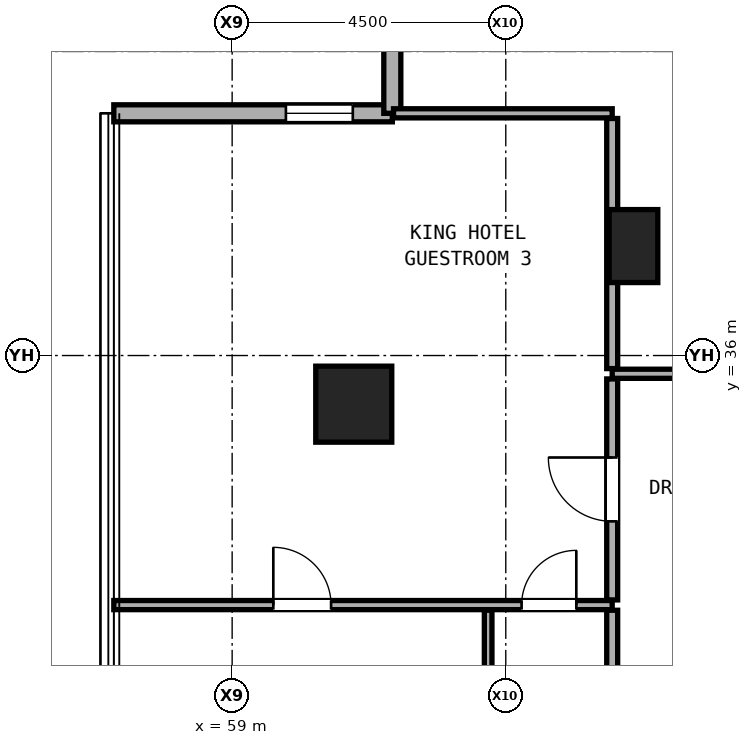
"""IFC4 building model, lengths in metres.
Left out: names, types, materials, properties, quantities, classifications, styles, units other than length and angle.
Written with IfcOpenShell. Run it as: python <this file> out.ifc"""

import sys

from ifc_helpers import new_model, si_unit, direction, frame, frame_2d, origin, origin_2d, place, context, subcontext, project, spatial, rectangle, hollow_rectangle, extrude, element, fill, save


model = new_model("IFC4")
c1 = context("Model", 3, precision=1e-05, world=origin(), true_north=direction((0.0, 1.0)))
c2 = subcontext(c1, "Body", "Model", "MODEL_VIEW")
j1 = project(units=[si_unit("LENGTHUNIT", "METRE"), si_unit("PLANEANGLEUNIT", "RADIAN")], contexts=[c1])
p1 = place(None, origin())
s1 = spatial("IfcSite", under=j1, at=p1, CompositionType="ELEMENT")
p2 = place(p1, origin())
s2 = spatial("IfcBuilding", under=s1, at=p2, CompositionType="ELEMENT")
p3 = place(p2, frame((0.0, 0.0, 45.5)))
s3 = spatial("IfcBuildingStorey", under=s2, at=p3, CompositionType="ELEMENT", Elevation=45.5)
p4 = place(p3, frame((61.0, 35.2, 0.0), z_axis=(0.0, 0.0, 1.0), x_axis=(1.0, 0.0, 0.0)))
e1 = element("IfcColumn", 1, at=p4, inside=s3, PredefinedType="COLUMN", context=c2, shape_type="SweptSolid", body=[
    extrude(hollow_rectangle(XDim=1.25, YDim=1.25, WallThickness=0.07, at=origin_2d()), origin(), (0.0, 0.0, 1.0), 3.3),
])
p5 = place(p3, frame((65.6, 37.8, 0.0), z_axis=(0.0, 0.0, 1.0), x_axis=(1.0, 0.0, 0.0)))
e2 = element("IfcColumn", 2, at=p5, inside=s3, PredefinedType="PILASTER", context=c2, shape_type="SweptSolid", body=[
    extrude(rectangle(XDim=0.8, YDim=1.2, at=origin_2d()), origin(), (0.0, 0.0, 1.0), 3.3),
])
p6 = place(p3, frame((61.634, 39.983, 0.0), z_axis=(0.0, 0.0, 1.0), x_axis=(-1.0, 0.0, 0.0)))
e3 = element("IfcWall", 3, at=p6, inside=s3, PredefinedType="SOLIDWALL", context=c2, shape_type="SweptSolid", body=[
    extrude(rectangle(XDim=4.58, YDim=0.28, at=frame_2d((2.29, 0.0))), origin(), (0.0, 0.0, 1.0), 3.04),
])
p7 = place(p6, frame((0.65, 0.0, 0.85)))
e4 = element("IfcOpeningElement", 4, at=p7, cuts=e3, PredefinedType="OPENING", context=c2, shape_type="SweptSolid", body=[
    extrude(rectangle(XDim=1.1, YDim=2.0, at=frame_2d((0.55, 1.0))), frame((0.0, 0.15, 0.0), z_axis=(0.0, -1.0, 0.0), x_axis=(1.0, 0.0, 0.0)), (0.0, 0.0, 1.0), 0.3),
])
p8 = place(p3, frame((61.634, 44.563, 0.0), z_axis=(0.0, 0.0, 1.0), x_axis=(0.0, -1.0, 0.0)))
e5 = element("IfcWall", 5, at=p8, inside=s3, PredefinedType="SOLIDWALL", context=c2, shape_type="SweptSolid", body=[
    extrude(rectangle(XDim=4.58, YDim=0.28, at=frame_2d((2.29, 0.0))), origin(), (0.0, 0.0, 1.0), 3.04),
])
p9 = place(p3, frame((57.054, 31.896, 0.0), z_axis=(0.0, 0.0, 1.0), x_axis=(1.0, 0.0, 0.0)))
e6 = element("IfcWall", 6, at=p9, inside=s3, PredefinedType="PARTITIONING", context=c2, shape_type="SweptSolid", body=[
    extrude(rectangle(XDim=8.196, YDim=0.15, at=frame_2d((4.098, 0.0))), origin(), (0.0, 0.0, 1.0), 2.196),
])
p10 = place(p9, frame((2.623, 0.0, 0.0)))
e7 = element("IfcOpeningElement", 7, at=p10, cuts=e6, PredefinedType="OPENING", context=c2, shape_type="SweptSolid", body=[
    extrude(rectangle(XDim=0.95, YDim=2.15, at=frame_2d((0.475, 1.075))), frame((0.0, 0.085, 0.0), z_axis=(0.0, -1.0, 0.0), x_axis=(1.0, 0.0, 0.0)), (0.0, 0.0, 1.0), 0.17),
])
p11 = place(p9, frame((6.706, 0.0, 0.0)))
e8 = element("IfcOpeningElement", 8, at=p11, cuts=e6, PredefinedType="OPENING", context=c2, shape_type="SweptSolid", body=[
    extrude(rectangle(XDim=0.9, YDim=2.1, at=frame_2d((0.45, 1.05))), frame((0.0, 0.085, 0.0), z_axis=(0.0, -1.0, 0.0), x_axis=(1.0, 0.0, 0.0)), (0.0, 0.0, 1.0), 0.17),
])
p12 = place(p3, frame((65.25, 35.7, 0.0), z_axis=(0.0, 0.0, 1.0), x_axis=(1.0, 0.0, 0.0)))
e9 = element("IfcWall", 9, at=p12, inside=s3, PredefinedType="PARTITIONING", context=c2, shape_type="SweptSolid", body=[
    extrude(rectangle(XDim=1.37, YDim=0.15, at=frame_2d((0.685, 0.0))), origin(), (0.0, 0.0, 1.0), 3.06),
])
p13 = place(p3, frame((61.654, 39.983, 0.0), z_axis=(0.0, 0.0, 1.0), x_axis=(1.0, 0.0, 0.0)))
e10 = element("IfcWall", 10, at=p13, inside=s3, PredefinedType="PARTITIONING", context=c2, shape_type="SweptSolid", body=[
    extrude(rectangle(XDim=3.596, YDim=0.15, at=frame_2d((1.798, 0.0))), origin(), (0.0, 0.0, 1.0), 3.06),
])
p14 = place(p3, frame((63.21, 29.681, 0.0), z_axis=(0.0, 0.0, 1.0), x_axis=(0.0, 1.0, 0.0)))
e11 = element("IfcWall", 11, at=p14, inside=s3, PredefinedType="PARTITIONING", context=c2, shape_type="SweptSolid", body=[
    extrude(rectangle(XDim=2.13, YDim=0.125, at=frame_2d((1.065, 0.0))), origin(), (0.0, 0.0, 1.0), 3.06),
])
p15 = place(p3, frame((65.25, 29.681, 0.0), z_axis=(0.0, 0.0, 1.0), x_axis=(0.0, 1.0, 0.0)))
e12 = element("IfcWall", 12, at=p15, inside=s3, PredefinedType="PARTITIONING", context=c2, shape_type="SweptSolid", body=[
    extrude(rectangle(XDim=2.13, YDim=0.18, at=frame_2d((1.065, 0.0))), origin(), (0.0, 0.0, 1.0), 3.06),
])
p16 = place(p3, frame((65.25, 31.981, 0.0), z_axis=(0.0, 0.0, 1.0), x_axis=(0.0, 1.0, 0.0)))
e13 = element("IfcWall", 13, at=p16, inside=s3, PredefinedType="PARTITIONING", context=c2, shape_type="SweptSolid", body=[
    extrude(rectangle(XDim=3.634, YDim=0.18, at=frame_2d((1.817, 0.0))), origin(), (0.0, 0.0, 1.0), 2.452),
])
p17 = place(p16, frame((1.292, 0.0, 0.0)))
e14 = element("IfcOpeningElement", 14, at=p17, cuts=e13, PredefinedType="OPENING", context=c2, shape_type="SweptSolid", body=[
    extrude(rectangle(XDim=1.05, YDim=2.2, at=frame_2d((0.525, 1.1))), frame((0.0, 0.1, 0.0), z_axis=(0.0, -1.0, 0.0), x_axis=(1.0, 0.0, 0.0)), (0.0, 0.0, 1.0), 0.2),
])
p18 = place(p3, frame((65.25, 35.785, 0.0), z_axis=(0.0, 0.0, 1.0), x_axis=(0.0, 1.0, 0.0)))
e15 = element("IfcWall", 15, at=p18, inside=s3, PredefinedType="PARTITIONING", context=c2, shape_type="SweptSolid", body=[
    extrude(rectangle(XDim=4.113, YDim=0.18, at=frame_2d((2.057, 0.0))), origin(), (0.0, 0.0, 1.0), 2.436),
])
p19 = place(p7, origin())
e16 = element("IfcWindow", 16, at=p19, inside=s3, PartitioningType="SINGLE_PANEL", PredefinedType="WINDOW", context=c2, shape_type="SweptSolid", body=[
    extrude(rectangle(XDim=1.1, YDim=2.0, at=frame_2d((0.55, 1.0))), frame((0.0, 0.03, 0.0), z_axis=(0.0, -1.0, 0.0), x_axis=(1.0, 0.0, 0.0)), (0.0, 0.0, 1.0), 0.06),
])
fill(e4, e16)
p20 = place(p17, origin())
e17 = element("IfcDoor", 17, at=p20, inside=s3, OperationType="SINGLE_SWING_RIGHT", PredefinedType="DOOR", context=c2, shape_type="SweptSolid", body=[
    extrude(rectangle(XDim=1.05, YDim=2.2, at=frame_2d((0.525, 1.1))), frame((0.0, 0.025, 0.0), z_axis=(0.0, -1.0, 0.0), x_axis=(1.0, 0.0, 0.0)), (0.0, 0.0, 1.0), 0.05),
])
fill(e14, e17)
p21 = place(p10, origin())
e18 = element("IfcDoor", 18, at=p21, inside=s3, OperationType="SINGLE_SWING_LEFT", PredefinedType="DOOR", context=c2, shape_type="SweptSolid", body=[
    extrude(rectangle(XDim=0.95, YDim=2.15, at=frame_2d((0.475, 1.075))), frame((0.0, 0.025, 0.0), z_axis=(0.0, -1.0, 0.0), x_axis=(1.0, 0.0, 0.0)), (0.0, 0.0, 1.0), 0.05),
])
fill(e7, e18)
p22 = place(p11, origin())
e19 = element("IfcDoor", 19, at=p22, inside=s3, OperationType="SINGLE_SWING_RIGHT", PredefinedType="DOOR", context=c2, shape_type="SweptSolid", body=[
    extrude(rectangle(XDim=0.9, YDim=2.1, at=frame_2d((0.45, 1.05))), frame((0.0, 0.025, 0.0), z_axis=(0.0, -1.0, 0.0), x_axis=(1.0, 0.0, 0.0)), (0.0, 0.0, 1.0), 0.05),
])
fill(e8, e19)
save(model, sys.argv[1])
